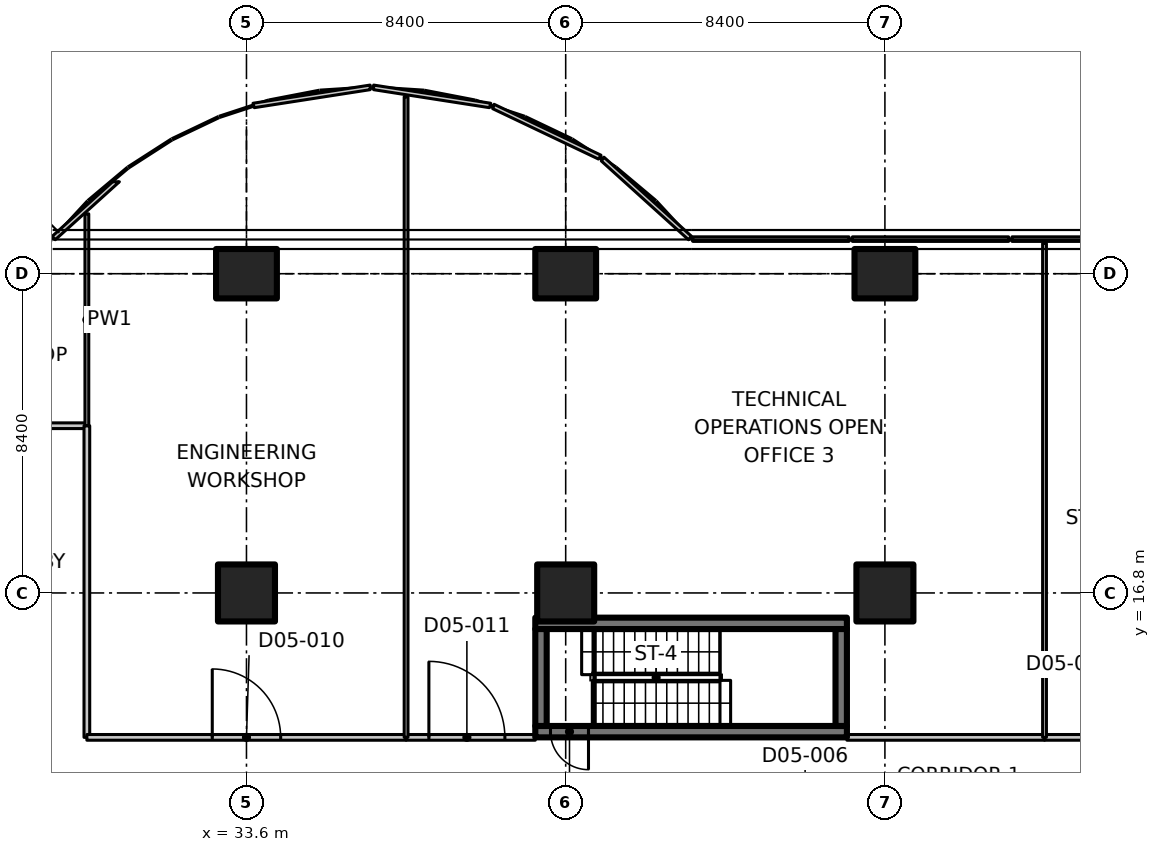
"""IFC4 building model, lengths in metres.
Left out: names, types, materials, properties, quantities, classifications, styles, units other than length and angle.
Written with IfcOpenShell. Run it as: python <this file> out.ifc"""

import sys

from ifc_helpers import new_model, si_unit, direction, frame, frame_2d, origin, origin_2d, place, context, subcontext, project, spatial, polyline, rectangle, outline, extrude, element, fill, save


model = new_model("IFC4")
c1 = context("Model", 3, precision=1e-05, world=origin(), true_north=direction((0.0, 1.0)))
c2 = subcontext(c1, "Body", "Model", "MODEL_VIEW")
j1 = project(units=[si_unit("LENGTHUNIT", "METRE"), si_unit("PLANEANGLEUNIT", "RADIAN")], contexts=[c1])
p1 = place(None, origin())
s1 = spatial("IfcSite", under=j1, at=p1, CompositionType="ELEMENT")
p2 = place(p1, origin())
s2 = spatial("IfcBuilding", under=s1, at=p2, CompositionType="ELEMENT")
p3 = place(p2, frame((0.0, 0.0, 27.5)))
s3 = spatial("IfcBuildingStorey", under=s2, at=p3, CompositionType="ELEMENT", Elevation=27.5)
p4 = place(p3, frame((33.6, 16.8, 0.0), z_axis=(0.0, 0.0, 1.0), x_axis=(1.0, 0.0, 0.0)))
e1 = element("IfcColumn", 1, at=p4, inside=s3, PredefinedType="COLUMN", context=c2, shape_type="SweptSolid", body=[
    extrude(rectangle(XDim=1.5, YDim=1.5, at=origin_2d()), origin(), (0.0, 0.0, 1.0), 4.25),
])
p5 = place(p3, frame((33.6, 25.2, 0.0), z_axis=(0.0, 0.0, 1.0), x_axis=(0.0, 1.0, 0.0)))
e2 = element("IfcColumn", 2, at=p5, inside=s3, PredefinedType="COLUMN", context=c2, shape_type="SweptSolid", body=[
    extrude(rectangle(XDim=1.3, YDim=1.6, at=origin_2d()), origin(), (0.0, 0.0, 1.0), 4.25),
])
p6 = place(p3, frame((42.0, 16.8, 0.0), z_axis=(0.0, 0.0, 1.0), x_axis=(1.0, 0.0, 0.0)))
e3 = element("IfcColumn", 3, at=p6, inside=s3, PredefinedType="COLUMN", context=c2, shape_type="SweptSolid", body=[
    extrude(rectangle(XDim=1.5, YDim=1.5, at=origin_2d()), origin(), (0.0, 0.0, 1.0), 4.25),
])
p7 = place(p3, frame((42.0, 25.2, 0.0), z_axis=(0.0, 0.0, 1.0), x_axis=(0.0, 1.0, 0.0)))
e4 = element("IfcColumn", 4, at=p7, inside=s3, PredefinedType="COLUMN", context=c2, shape_type="SweptSolid", body=[
    extrude(rectangle(XDim=1.3, YDim=1.6, at=origin_2d()), origin(), (0.0, 0.0, 1.0), 4.25),
])
p8 = place(p3, frame((50.4, 16.8, 0.0), z_axis=(0.0, 0.0, 1.0), x_axis=(1.0, 0.0, 0.0)))
e5 = element("IfcColumn", 5, at=p8, inside=s3, PredefinedType="COLUMN", context=c2, shape_type="SweptSolid", body=[
    extrude(rectangle(XDim=1.5, YDim=1.5, at=origin_2d()), origin(), (0.0, 0.0, 1.0), 4.25),
])
p9 = place(p3, frame((50.4, 25.2, 0.0), z_axis=(0.0, 0.0, 1.0), x_axis=(0.0, 1.0, 0.0)))
e6 = element("IfcColumn", 6, at=p9, inside=s3, PredefinedType="COLUMN", context=c2, shape_type="SweptSolid", body=[
    extrude(rectangle(XDim=1.3, YDim=1.6, at=origin_2d()), origin(), (0.0, 0.0, 1.0), 4.25),
])
p10 = place(p3, origin())
e7 = element("IfcWall", 7, at=p10, inside=s3, PredefinedType="SOLIDWALL", context=c2, shape_type="SweptSolid", body=[
    extrude(outline(polyline([(53.745, 26.17), (53.745, 26.05), (57.855, 26.05), (57.855, 26.17), (53.745, 26.17)])), origin(), (0.0, 0.0, 1.0), 4.25),
])
p11 = place(p3, origin())
e8 = element("IfcWall", 8, at=p11, inside=s3, PredefinedType="SOLIDWALL", context=c2, shape_type="SweptSolid", body=[
    extrude(outline(polyline([(49.545, 26.17), (49.545, 26.05), (53.655, 26.05), (53.655, 26.17), (49.545, 26.17)])), origin(), (0.0, 0.0, 1.0), 4.25),
])
p12 = place(p3, origin())
e9 = element("IfcWall", 9, at=p12, inside=s3, PredefinedType="SOLIDWALL", context=c2, shape_type="SweptSolid", body=[
    extrude(outline(polyline([(45.345, 26.17), (45.345, 26.05), (49.455, 26.05), (49.455, 26.17), (45.345, 26.17)])), origin(), (0.0, 0.0, 1.0), 4.25),
])
p13 = place(p3, origin())
e10 = element("IfcWall", 10, at=p13, inside=s3, PredefinedType="SOLIDWALL", context=c2, shape_type="SweptSolid", body=[
    extrude(outline(polyline([(45.233, 26.093), (45.313, 26.182), (43.005, 28.267), (42.938, 28.167), (45.233, 26.093)])), origin(), (0.0, 0.0, 1.0), 4.25),
])
p14 = place(p3, origin())
e11 = element("IfcWall", 11, at=p14, inside=s3, PredefinedType="SOLIDWALL", context=c2, shape_type="SweptSolid", body=[
    extrude(outline(polyline([(42.863, 28.217), (42.93, 28.317), (40.115, 29.658), (40.079, 29.542), (42.863, 28.217)])), origin(), (0.0, 0.0, 1.0), 4.25),
])
p15 = place(p3, origin())
e12 = element("IfcWall", 12, at=p15, inside=s3, PredefinedType="SOLIDWALL", context=c2, shape_type="SweptSolid", body=[
    extrude(outline(polyline([(39.993, 29.569), (40.029, 29.685), (36.945, 30.164), (36.945, 30.042), (39.993, 29.569)])), origin(), (0.0, 0.0, 1.0), 4.25),
])
p16 = place(p3, origin())
e13 = element("IfcWall", 13, at=p16, inside=s3, PredefinedType="SOLIDWALL", context=c2, shape_type="SweptSolid", body=[
    extrude(outline(polyline([(36.855, 30.042), (36.855, 30.164), (33.771, 29.685), (33.807, 29.569), (36.855, 30.042)])), origin(), (0.0, 0.0, 1.0), 4.25),
])
p17 = place(p3, origin())
e14 = element("IfcWall", 14, at=p17, inside=s3, PredefinedType="SOLIDWALL", context=c2, shape_type="SweptSolid", body=[
    extrude(outline(polyline([(30.256, 27.619), (30.077, 27.619), (28.487, 26.182), (28.567, 26.093), (30.256, 27.619)])), origin(), (0.0, 0.0, 1.0), 4.25),
])
p18 = place(p3, frame((49.4, 13.15, 0.0), z_axis=(0.0, 0.0, 1.0), x_axis=(-1.0, 0.0, 0.0)))
e15 = element("IfcWall", 15, at=p18, inside=s3, PredefinedType="SHEAR", context=c2, shape_type="SweptSolid", body=[
    extrude(rectangle(XDim=8.2, YDim=0.3, at=frame_2d((4.1, 0.0))), origin(), (0.0, 0.0, 1.0), 4.25),
])
p19 = place(p18, frame((6.8, 0.0, 0.0)))
e16 = element("IfcOpeningElement", 16, at=p19, cuts=e15, PredefinedType="OPENING", context=c2, shape_type="SweptSolid", body=[
    extrude(rectangle(XDim=1.0, YDim=2.1, at=frame_2d((0.5, 1.05))), frame((0.0, 0.16, 0.0), z_axis=(0.0, -1.0, 0.0), x_axis=(1.0, 0.0, 0.0)), (0.0, 0.0, 1.0), 0.32),
])
p20 = place(p3, frame((41.2, 16.0, 0.0), z_axis=(0.0, 0.0, 1.0), x_axis=(1.0, 0.0, 0.0)))
e17 = element("IfcWall", 17, at=p20, inside=s3, PredefinedType="SHEAR", context=c2, shape_type="SweptSolid", body=[
    extrude(rectangle(XDim=8.2, YDim=0.3, at=frame_2d((4.1, 0.0))), origin(), (0.0, 0.0, 1.0), 4.25),
])
for number, where, z_axis, x_axis in (
    (18, (41.35, 13.3, 0.0), (0.0, 0.0, 1.0), (0.0, 1.0, 0.0)),
    (19, (49.25, 13.3, 0.0), (0.0, 0.0, 1.0), (0.0, 1.0, 0.0)),
):
    element("IfcWall", number, at=place(p3, frame(where, z_axis=z_axis, x_axis=x_axis)), inside=s3, PredefinedType="SHEAR", context=c2, shape_type="SweptSolid", body=[
        extrude(rectangle(XDim=2.55, YDim=0.3, at=frame_2d((1.275, 0.0))), origin(), (0.0, 0.0, 1.0), 4.25),
    ])
p21 = place(p3, frame((25.2, 21.2, 0.0), z_axis=(0.0, 0.0, 1.0), x_axis=(1.0, 0.0, 0.0)))
e20 = element("IfcWall", 20, at=p21, inside=s3, PredefinedType="PARTITIONING", context=c2, shape_type="SweptSolid", body=[
    extrude(rectangle(XDim=4.2, YDim=0.15, at=frame_2d((2.1, 0.0))), origin(), (0.0, 0.0, 1.0), 4.23),
])
p22 = place(p3, frame((29.4, 21.2, 0.0), z_axis=(0.0, 0.0, 1.0), x_axis=(0.0, -1.0, 0.0)))
e21 = element("IfcWall", 21, at=p22, inside=s3, PredefinedType="PARTITIONING", context=c2, shape_type="SweptSolid", body=[
    extrude(rectangle(XDim=8.2, YDim=0.15, at=frame_2d((4.1, 0.0))), origin(), (0.0, 0.0, 1.0), 4.23),
])
p23 = place(p3, frame((29.4, 26.776, 0.0), z_axis=(0.0, 0.0, 1.0), x_axis=(0.0, -1.0, 0.0)))
e22 = element("IfcWall", 22, at=p23, inside=s3, PredefinedType="PARTITIONING", context=c2, shape_type="SweptSolid", body=[
    extrude(outline(polyline([(0.0, 0.0), (5.576, 0.0), (5.576, 4.23), (2.026, 4.23), (2.024, 3.88), (1.128, 3.88), (1.126, 4.23), (0.0, 4.23), (0.0, 0.0)])), frame((0.0, 0.05, 0.0), z_axis=(0.0, -1.0, 0.0), x_axis=(1.0, 0.0, 0.0)), (0.0, 0.0, 1.0), 0.1),
])
p24 = place(p3, frame((28.432, 31.168, 0.0), z_axis=(0.0, 0.0, 1.0), x_axis=(-0.541288698077, -0.840836812547, 0.0)))
e23 = element("IfcWall", 23, at=p24, inside=s3, PredefinedType="PARTITIONING", context=c2, shape_type="SweptSolid", body=[
    extrude(rectangle(XDim=0.325, YDim=0.15, at=frame_2d((0.163, 0.0))), origin(), (0.0, 0.0, 1.0), 4.23),
])
p25 = place(p3, frame((29.4, 13.0, 0.0), z_axis=(0.0, 0.0, 1.0), x_axis=(1.0, 0.0, 0.0)))
e24 = element("IfcWall", 24, at=p25, inside=s3, PredefinedType="PARTITIONING", context=c2, shape_type="SweptSolid", body=[
    extrude(rectangle(XDim=8.4, YDim=0.15, at=frame_2d((4.2, 0.0))), origin(), (0.0, 0.0, 1.0), 4.23),
])
p26 = place(p25, frame((3.3, 0.0, 0.0)))
e25 = element("IfcOpeningElement", 25, at=p26, cuts=e24, PredefinedType="OPENING", context=c2, shape_type="SweptSolid", body=[
    extrude(rectangle(XDim=1.8, YDim=2.1, at=frame_2d((0.9, 1.05))), frame((0.0, 0.085, 0.0), z_axis=(0.0, -1.0, 0.0), x_axis=(1.0, 0.0, 0.0)), (0.0, 0.0, 1.0), 0.17),
])
p27 = place(p3, frame((37.8, 13.0, 0.0), z_axis=(0.0, 0.0, 1.0), x_axis=(1.0, 0.0, 0.0)))
e26 = element("IfcWall", 26, at=p27, inside=s3, PredefinedType="PARTITIONING", context=c2, shape_type="SweptSolid", body=[
    extrude(rectangle(XDim=3.4, YDim=0.15, at=frame_2d((1.7, 0.0))), origin(), (0.0, 0.0, 1.0), 4.23),
])
p28 = place(p27, frame((0.6, 0.0, 0.0)))
e27 = element("IfcOpeningElement", 27, at=p28, cuts=e26, PredefinedType="OPENING", context=c2, shape_type="SweptSolid", body=[
    extrude(rectangle(XDim=2.0, YDim=2.4, at=frame_2d((1.0, 1.2))), frame((0.0, 0.085, 0.0), z_axis=(0.0, -1.0, 0.0), x_axis=(1.0, 0.0, 0.0)), (0.0, 0.0, 1.0), 0.17),
])
p29 = place(p3, frame((49.4, 13.0, 0.0), z_axis=(0.0, 0.0, 1.0), x_axis=(1.0, 0.0, 0.0)))
e28 = element("IfcWall", 28, at=p29, inside=s3, PredefinedType="PARTITIONING", context=c2, shape_type="SweptSolid", body=[
    extrude(rectangle(XDim=5.2, YDim=0.15, at=frame_2d((2.6, 0.0))), origin(), (0.0, 0.0, 1.0), 4.23),
])
p30 = place(p3, frame((54.6, 13.0, 0.0), z_axis=(0.0, 0.0, 1.0), x_axis=(1.0, 0.0, 0.0)))
e29 = element("IfcWall", 29, at=p30, inside=s3, PredefinedType="PARTITIONING", context=c2, shape_type="SweptSolid", body=[
    extrude(rectangle(XDim=3.4, YDim=0.15, at=frame_2d((1.7, 0.0))), origin(), (0.0, 0.0, 1.0), 4.23),
])
p31 = place(p30, frame((1.2, 0.0, 0.0)))
e30 = element("IfcOpeningElement", 30, at=p31, cuts=e29, PredefinedType="OPENING", context=c2, shape_type="SweptSolid", body=[
    extrude(rectangle(XDim=1.1, YDim=2.1, at=frame_2d((0.55, 1.05))), frame((0.0, 0.085, 0.0), z_axis=(0.0, -1.0, 0.0), x_axis=(1.0, 0.0, 0.0)), (0.0, 0.0, 1.0), 0.17),
])
p32 = place(p3, frame((37.8, 29.857, 0.0), z_axis=(0.0, 0.0, 1.0), x_axis=(0.0, -1.0, 0.0)))
e31 = element("IfcWall", 31, at=p32, inside=s3, PredefinedType="PARTITIONING", context=c2, shape_type="SweptSolid", body=[
    extrude(outline(polyline([(0.0, 0.0), (16.857, 0.0), (16.857, 4.23), (5.107, 4.23), (5.105, 3.88), (4.209, 3.88), (4.207, 4.23), (0.0, 4.23), (0.0, 0.0)])), frame((0.0, 0.05, 0.0), z_axis=(0.0, -1.0, 0.0), x_axis=(1.0, 0.0, 0.0)), (0.0, 0.0, 1.0), 0.1),
])
p33 = place(p3, frame((54.6, 25.998, 0.0), z_axis=(0.0, 0.0, 1.0), x_axis=(0.0, -1.0, 0.0)))
e32 = element("IfcWall", 32, at=p33, inside=s3, PredefinedType="PARTITIONING", context=c2, shape_type="SweptSolid", body=[
    extrude(outline(polyline([(0.0, 0.0), (12.998, 0.0), (12.998, 4.23), (1.248, 4.23), (1.246, 3.88), (0.35, 3.88), (0.348, 4.23), (0.0, 4.23), (0.0, 0.0)])), frame((0.0, 0.05, 0.0), z_axis=(0.0, -1.0, 0.0), x_axis=(1.0, 0.0, 0.0)), (0.0, 0.0, 1.0), 0.1),
])
p34 = place(p19, origin())
e33 = element("IfcDoor", 33, at=p34, inside=s3, OperationType="SINGLE_SWING_RIGHT", PredefinedType="DOOR", context=c2, shape_type="SweptSolid", body=[
    extrude(rectangle(XDim=1.0, YDim=2.1, at=frame_2d((0.5, 1.05))), frame((0.0, 0.025, 0.0), z_axis=(0.0, -1.0, 0.0), x_axis=(1.0, 0.0, 0.0)), (0.0, 0.0, 1.0), 0.05),
])
fill(e16, e33)
p35 = place(p26, origin())
e34 = element("IfcDoor", 34, at=p35, inside=s3, OperationType="DOUBLE_DOOR_SINGLE_SWING", PredefinedType="DOOR", context=c2, shape_type="SweptSolid", body=[
    extrude(rectangle(XDim=1.8, YDim=2.1, at=frame_2d((0.9, 1.05))), frame((0.0, 0.025, 0.0), z_axis=(0.0, -1.0, 0.0), x_axis=(1.0, 0.0, 0.0)), (0.0, 0.0, 1.0), 0.05),
])
fill(e25, e34)
p36 = place(p28, origin())
e35 = element("IfcDoor", 35, at=p36, inside=s3, OperationType="DOUBLE_DOOR_SINGLE_SWING", PredefinedType="DOOR", context=c2, shape_type="SweptSolid", body=[
    extrude(rectangle(XDim=2.0, YDim=2.4, at=frame_2d((1.0, 1.2))), frame((0.0, 0.025, 0.0), z_axis=(0.0, -1.0, 0.0), x_axis=(1.0, 0.0, 0.0)), (0.0, 0.0, 1.0), 0.05),
])
fill(e27, e35)
save(model, sys.argv[1])
